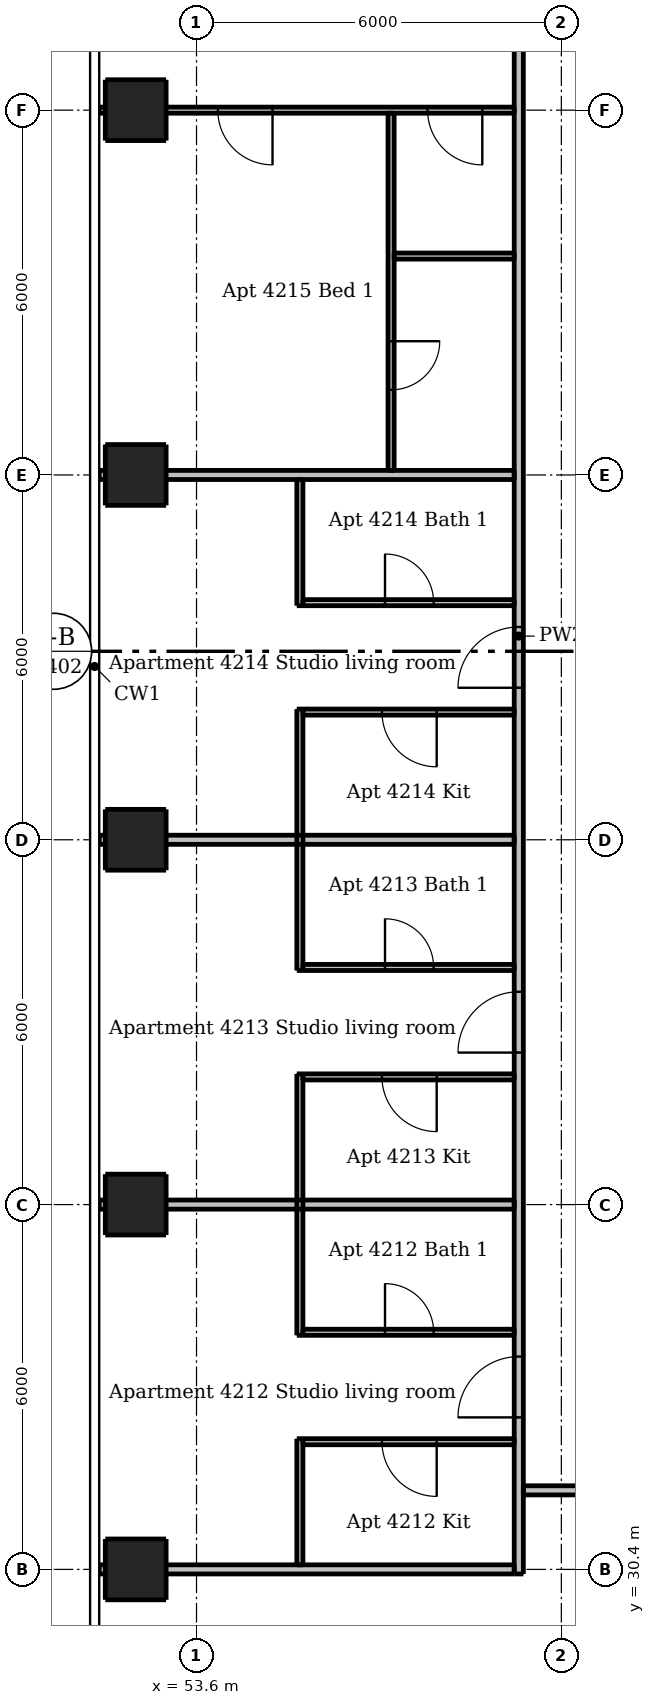
"""IFC4 building model, lengths in metres.
Left out: names, types, materials, properties, quantities, classifications, styles, units other than length and angle.
Written with IfcOpenShell. Run it as: python <this file> out.ifc"""

import sys

from ifc_helpers import new_model, si_unit, direction, frame, frame_2d, origin, origin_2d, place, context, subcontext, project, spatial, rectangle, extrude, element, fill, save


model = new_model("IFC4")
c1 = context("Model", 3, precision=1e-05, world=origin(), true_north=direction((0.0, 1.0)))
c2 = subcontext(c1, "Body", "Model", "MODEL_VIEW")
j1 = project(units=[si_unit("LENGTHUNIT", "METRE"), si_unit("PLANEANGLEUNIT", "RADIAN")], contexts=[c1])
p1 = place(None, origin())
s1 = spatial("IfcSite", under=j1, at=p1, CompositionType="ELEMENT")
p2 = place(p1, origin())
s2 = spatial("IfcBuilding", under=s1, at=p2, CompositionType="ELEMENT")
p3 = place(p2, frame((0.0, 0.0, 158.2)))
s3 = spatial("IfcBuildingStorey", under=s2, at=p3, CompositionType="ELEMENT", Elevation=158.2)
for number, where, z_axis, x_axis in (
    (1, (52.6, 30.4, 0.0), (0.0, 0.0, 1.0), (1.0, 0.0, 0.0)),
    (2, (52.6, 36.4, 0.0), (0.0, 0.0, 1.0), (1.0, 0.0, 0.0)),
    (3, (52.6, 42.4, 0.0), (0.0, 0.0, 1.0), (1.0, 0.0, 0.0)),
    (4, (52.6, 48.4, 0.0), (0.0, 0.0, 1.0), (1.0, 0.0, 0.0)),
    (5, (52.6, 54.4, 0.0), (0.0, 0.0, 1.0), (1.0, 0.0, 0.0)),
):
    element("IfcColumn", number, at=place(p3, frame(where, z_axis=z_axis, x_axis=x_axis)), inside=s3, PredefinedType="COLUMN", context=c2, shape_type="SweptSolid", body=[
        extrude(rectangle(XDim=1.0, YDim=1.0, at=origin_2d()), origin(), (0.0, 0.0, 1.0), 3.05),
    ])
p4 = place(p3, frame((55.3, 30.475, 0.0), z_axis=(0.0, 0.0, 1.0), x_axis=(0.0, 1.0, 0.0)))
e6 = element("IfcWall", 6, at=p4, inside=s3, PredefinedType="PARTITIONING", context=c2, shape_type="SweptSolid", body=[
    extrude(rectangle(XDim=2.075, YDim=0.1, at=frame_2d((1.038, 0.0))), origin(), (0.0, 0.0, 1.0), 3.05),
])
for number, where, z_axis, x_axis in (
    (7, (55.3, 34.25, 0.0), (0.0, 0.0, 1.0), (0.0, 1.0, 0.0)),
    (8, (55.3, 40.25, 0.0), (0.0, 0.0, 1.0), (0.0, 1.0, 0.0)),
):
    element("IfcWall", number, at=place(p3, frame(where, z_axis=z_axis, x_axis=x_axis)), inside=s3, PredefinedType="PARTITIONING", context=c2, shape_type="SweptSolid", body=[
        extrude(rectangle(XDim=4.3, YDim=0.1, at=frame_2d((2.15, 0.0))), origin(), (0.0, 0.0, 1.0), 3.05),
    ])
p5 = place(p3, frame((55.3, 46.25, 0.0), z_axis=(0.0, 0.0, 1.0), x_axis=(0.0, 1.0, 0.0)))
e9 = element("IfcWall", 9, at=p5, inside=s3, PredefinedType="PARTITIONING", context=c2, shape_type="SweptSolid", body=[
    extrude(rectangle(XDim=2.075, YDim=0.1, at=frame_2d((1.038, 0.0))), origin(), (0.0, 0.0, 1.0), 3.05),
])
p6 = place(p3, frame((56.8, 54.35, 0.0), z_axis=(0.0, 0.0, 1.0), x_axis=(0.0, -1.0, 0.0)))
e10 = element("IfcWall", 10, at=p6, inside=s3, PredefinedType="PARTITIONING", context=c2, shape_type="SweptSolid", body=[
    extrude(rectangle(XDim=5.875, YDim=0.1, at=frame_2d((2.938, 0.0))), origin(), (0.0, 0.0, 1.0), 3.05),
])
p7 = place(p6, frame((3.75, 0.0, 0.0)))
e11 = element("IfcOpeningElement", 11, at=p7, cuts=e10, PredefinedType="OPENING", context=c2, shape_type="SweptSolid", body=[
    extrude(rectangle(XDim=0.8, YDim=2.1, at=frame_2d((0.4, 1.05))), frame((0.0, 0.06, 0.0), z_axis=(0.0, -1.0, 0.0), x_axis=(1.0, 0.0, 0.0)), (0.0, 0.0, 1.0), 0.12),
])
p8 = place(p3, frame((58.825, 54.4, 0.0), z_axis=(0.0, 0.0, 1.0), x_axis=(-1.0, 0.0, 0.0)))
e12 = element("IfcWall", 12, at=p8, inside=s3, PredefinedType="PARTITIONING", context=c2, shape_type="SweptSolid", body=[
    extrude(rectangle(XDim=6.825, YDim=0.1, at=frame_2d((3.413, 0.0))), origin(), (0.0, 0.0, 1.0), 2.516),
])
p9 = place(p8, frame((0.525, 0.0, 0.0)))
e13 = element("IfcOpeningElement", 13, at=p9, cuts=e12, PredefinedType="OPENING", context=c2, shape_type="SweptSolid", body=[
    extrude(rectangle(XDim=0.9, YDim=2.1, at=frame_2d((0.45, 1.05))), frame((0.0, 0.06, 0.0), z_axis=(0.0, -1.0, 0.0), x_axis=(1.0, 0.0, 0.0)), (0.0, 0.0, 1.0), 0.12),
])
p10 = place(p8, frame((3.975, 0.0, 0.0)))
e14 = element("IfcOpeningElement", 14, at=p10, cuts=e12, PredefinedType="OPENING", context=c2, shape_type="SweptSolid", body=[
    extrude(rectangle(XDim=0.9, YDim=2.1, at=frame_2d((0.45, 1.05))), frame((0.0, 0.06, 0.0), z_axis=(0.0, -1.0, 0.0), x_axis=(1.0, 0.0, 0.0)), (0.0, 0.0, 1.0), 0.12),
])
p11 = place(p3, frame((56.85, 52.0, 0.0), z_axis=(0.0, 0.0, 1.0), x_axis=(1.0, 0.0, 0.0)))
e15 = element("IfcWall", 15, at=p11, inside=s3, PredefinedType="PARTITIONING", context=c2, shape_type="SweptSolid", body=[
    extrude(rectangle(XDim=1.975, YDim=0.1, at=frame_2d((0.987, 0.0))), origin(), (0.0, 0.0, 1.0), 3.05),
])
p12 = place(p3, frame((55.35, 46.3, 0.0), z_axis=(0.0, 0.0, 1.0), x_axis=(1.0, 0.0, 0.0)))
e16 = element("IfcWall", 16, at=p12, inside=s3, PredefinedType="PARTITIONING", context=c2, shape_type="SweptSolid", body=[
    extrude(rectangle(XDim=3.475, YDim=0.1, at=frame_2d((1.737, 0.0))), origin(), (0.0, 0.0, 1.0), 3.05),
])
p13 = place(p12, frame((1.35, 0.0, 0.0)))
e17 = element("IfcOpeningElement", 17, at=p13, cuts=e16, PredefinedType="OPENING", context=c2, shape_type="SweptSolid", body=[
    extrude(rectangle(XDim=0.8, YDim=2.1, at=frame_2d((0.4, 1.05))), frame((0.0, 0.06, 0.0), z_axis=(0.0, -1.0, 0.0), x_axis=(1.0, 0.0, 0.0)), (0.0, 0.0, 1.0), 0.12),
])
p14 = place(p3, frame((58.825, 44.5, 0.0), z_axis=(0.0, 0.0, 1.0), x_axis=(-1.0, 0.0, 0.0)))
e18 = element("IfcWall", 18, at=p14, inside=s3, PredefinedType="PARTITIONING", context=c2, shape_type="SweptSolid", body=[
    extrude(rectangle(XDim=3.475, YDim=0.1, at=frame_2d((1.737, 0.0))), origin(), (0.0, 0.0, 1.0), 3.05),
])
p15 = place(p14, frame((1.275, 0.0, 0.0)))
e19 = element("IfcOpeningElement", 19, at=p15, cuts=e18, PredefinedType="OPENING", context=c2, shape_type="SweptSolid", body=[
    extrude(rectangle(XDim=0.9, YDim=2.1, at=frame_2d((0.45, 1.05))), frame((0.0, 0.06, 0.0), z_axis=(0.0, -1.0, 0.0), x_axis=(1.0, 0.0, 0.0)), (0.0, 0.0, 1.0), 0.12),
])
p16 = place(p3, frame((55.35, 40.3, 0.0), z_axis=(0.0, 0.0, 1.0), x_axis=(1.0, 0.0, 0.0)))
e20 = element("IfcWall", 20, at=p16, inside=s3, PredefinedType="PARTITIONING", context=c2, shape_type="SweptSolid", body=[
    extrude(rectangle(XDim=3.475, YDim=0.1, at=frame_2d((1.737, 0.0))), origin(), (0.0, 0.0, 1.0), 3.05),
])
p17 = place(p16, frame((1.35, 0.0, 0.0)))
e21 = element("IfcOpeningElement", 21, at=p17, cuts=e20, PredefinedType="OPENING", context=c2, shape_type="SweptSolid", body=[
    extrude(rectangle(XDim=0.8, YDim=2.1, at=frame_2d((0.4, 1.05))), frame((0.0, 0.06, 0.0), z_axis=(0.0, -1.0, 0.0), x_axis=(1.0, 0.0, 0.0)), (0.0, 0.0, 1.0), 0.12),
])
p18 = place(p3, frame((58.825, 38.5, 0.0), z_axis=(0.0, 0.0, 1.0), x_axis=(-1.0, 0.0, 0.0)))
e22 = element("IfcWall", 22, at=p18, inside=s3, PredefinedType="PARTITIONING", context=c2, shape_type="SweptSolid", body=[
    extrude(rectangle(XDim=3.475, YDim=0.1, at=frame_2d((1.737, 0.0))), origin(), (0.0, 0.0, 1.0), 3.05),
])
p19 = place(p18, frame((1.275, 0.0, 0.0)))
e23 = element("IfcOpeningElement", 23, at=p19, cuts=e22, PredefinedType="OPENING", context=c2, shape_type="SweptSolid", body=[
    extrude(rectangle(XDim=0.9, YDim=2.1, at=frame_2d((0.45, 1.05))), frame((0.0, 0.06, 0.0), z_axis=(0.0, -1.0, 0.0), x_axis=(1.0, 0.0, 0.0)), (0.0, 0.0, 1.0), 0.12),
])
p20 = place(p3, frame((55.35, 34.3, 0.0), z_axis=(0.0, 0.0, 1.0), x_axis=(1.0, 0.0, 0.0)))
e24 = element("IfcWall", 24, at=p20, inside=s3, PredefinedType="PARTITIONING", context=c2, shape_type="SweptSolid", body=[
    extrude(rectangle(XDim=3.475, YDim=0.1, at=frame_2d((1.737, 0.0))), origin(), (0.0, 0.0, 1.0), 3.05),
])
p21 = place(p20, frame((1.35, 0.0, 0.0)))
e25 = element("IfcOpeningElement", 25, at=p21, cuts=e24, PredefinedType="OPENING", context=c2, shape_type="SweptSolid", body=[
    extrude(rectangle(XDim=0.8, YDim=2.1, at=frame_2d((0.4, 1.05))), frame((0.0, 0.06, 0.0), z_axis=(0.0, -1.0, 0.0), x_axis=(1.0, 0.0, 0.0)), (0.0, 0.0, 1.0), 0.12),
])
p22 = place(p3, frame((58.825, 32.5, 0.0), z_axis=(0.0, 0.0, 1.0), x_axis=(-1.0, 0.0, 0.0)))
e26 = element("IfcWall", 26, at=p22, inside=s3, PredefinedType="PARTITIONING", context=c2, shape_type="SweptSolid", body=[
    extrude(rectangle(XDim=3.475, YDim=0.1, at=frame_2d((1.737, 0.0))), origin(), (0.0, 0.0, 1.0), 3.05),
])
p23 = place(p22, frame((1.275, 0.0, 0.0)))
e27 = element("IfcOpeningElement", 27, at=p23, cuts=e26, PredefinedType="OPENING", context=c2, shape_type="SweptSolid", body=[
    extrude(rectangle(XDim=0.9, YDim=2.1, at=frame_2d((0.45, 1.05))), frame((0.0, 0.06, 0.0), z_axis=(0.0, -1.0, 0.0), x_axis=(1.0, 0.0, 0.0)), (0.0, 0.0, 1.0), 0.12),
])
p24 = place(p3, frame((58.9, 30.325, 0.0), z_axis=(0.0, 0.0, 1.0), x_axis=(0.0, 1.0, 0.0)))
e28 = element("IfcWall", 28, at=p24, inside=s3, PredefinedType="PARTITIONING", context=c2, shape_type="SweptSolid", body=[
    extrude(rectangle(XDim=30.85, YDim=0.15, at=frame_2d((15.425, 0.0))), origin(), (0.0, 0.0, 1.0), 3.05),
])
p25 = place(p24, frame((2.575, 0.0, 0.0)))
e29 = element("IfcOpeningElement", 29, at=p25, cuts=e28, PredefinedType="OPENING", context=c2, shape_type="SweptSolid", body=[
    extrude(rectangle(XDim=1.0, YDim=2.1, at=frame_2d((0.5, 1.05))), frame((0.0, 0.085, 0.0), z_axis=(0.0, -1.0, 0.0), x_axis=(1.0, 0.0, 0.0)), (0.0, 0.0, 1.0), 0.17),
])
p26 = place(p24, frame((8.575, 0.0, 0.0)))
e30 = element("IfcOpeningElement", 30, at=p26, cuts=e28, PredefinedType="OPENING", context=c2, shape_type="SweptSolid", body=[
    extrude(rectangle(XDim=1.0, YDim=2.1, at=frame_2d((0.5, 1.05))), frame((0.0, 0.085, 0.0), z_axis=(0.0, -1.0, 0.0), x_axis=(1.0, 0.0, 0.0)), (0.0, 0.0, 1.0), 0.17),
])
p27 = place(p24, frame((14.575, 0.0, 0.0)))
e31 = element("IfcOpeningElement", 31, at=p27, cuts=e28, PredefinedType="OPENING", context=c2, shape_type="SweptSolid", body=[
    extrude(rectangle(XDim=1.0, YDim=2.1, at=frame_2d((0.5, 1.05))), frame((0.0, 0.085, 0.0), z_axis=(0.0, -1.0, 0.0), x_axis=(1.0, 0.0, 0.0)), (0.0, 0.0, 1.0), 0.17),
])
p28 = place(p24, frame((26.925, 0.0, 0.0)))
e32 = element("IfcOpeningElement", 32, at=p28, cuts=e28, PredefinedType="OPENING", context=c2, shape_type="SweptSolid", body=[
    extrude(rectangle(XDim=1.0, YDim=2.1, at=frame_2d((0.5, 1.05))), frame((0.0, 0.085, 0.0), z_axis=(0.0, -1.0, 0.0), x_axis=(1.0, 0.0, 0.0)), (0.0, 0.0, 1.0), 0.17),
])
for number, where, z_axis, x_axis in (
    (33, (52.0, 48.4, 0.0), (0.0, 0.0, 1.0), (1.0, 0.0, 0.0)),
    (34, (52.0, 42.4, 0.0), (0.0, 0.0, 1.0), (1.0, 0.0, 0.0)),
    (35, (52.0, 36.4, 0.0), (0.0, 0.0, 1.0), (1.0, 0.0, 0.0)),
):
    element("IfcWall", number, at=place(p3, frame(where, z_axis=z_axis, x_axis=x_axis)), inside=s3, PredefinedType="PARTITIONING", context=c2, shape_type="SweptSolid", body=[
        extrude(rectangle(XDim=6.825, YDim=0.15, at=frame_2d((3.413, 0.0))), origin(), (0.0, 0.0, 1.0), 2.516),
    ])
p29 = place(p3, frame((89.525, 31.7, 0.0), z_axis=(0.0, 0.0, 1.0), x_axis=(-1.0, 0.0, 0.0)))
e36 = element("IfcWall", 36, at=p29, inside=s3, PredefinedType="PARTITIONING", context=c2, shape_type="SweptSolid", body=[
    extrude(rectangle(XDim=30.55, YDim=0.15, at=frame_2d((15.275, 0.0))), origin(), (0.0, 0.0, 1.0), 3.05),
])
p30 = place(p29, frame((26.775, 0.0, 0.0)))
e37 = element("IfcOpeningElement", 37, at=p30, cuts=e36, PredefinedType="OPENING", context=c2, shape_type="SweptSolid", body=[
    extrude(rectangle(XDim=1.0, YDim=2.1, at=frame_2d((0.5, 1.05))), frame((0.0, 0.085, 0.0), z_axis=(0.0, -1.0, 0.0), x_axis=(1.0, 0.0, 0.0)), (0.0, 0.0, 1.0), 0.17),
])
p31 = place(p29, frame((14.425, 0.0, 0.0)))
e38 = element("IfcOpeningElement", 38, at=p31, cuts=e36, PredefinedType="OPENING", context=c2, shape_type="SweptSolid", body=[
    extrude(rectangle(XDim=1.0, YDim=2.1, at=frame_2d((0.5, 1.05))), frame((0.0, 0.085, 0.0), z_axis=(0.0, -1.0, 0.0), x_axis=(1.0, 0.0, 0.0)), (0.0, 0.0, 1.0), 0.17),
])
p32 = place(p29, frame((6.575, 0.0, 0.0)))
e39 = element("IfcOpeningElement", 39, at=p32, cuts=e36, PredefinedType="OPENING", context=c2, shape_type="SweptSolid", body=[
    extrude(rectangle(XDim=1.0, YDim=2.1, at=frame_2d((0.5, 1.05))), frame((0.0, 0.085, 0.0), z_axis=(0.0, -1.0, 0.0), x_axis=(1.0, 0.0, 0.0)), (0.0, 0.0, 1.0), 0.17),
])
p33 = place(p3, frame((52.0, 30.4, 0.0), z_axis=(0.0, 0.0, 1.0), x_axis=(1.0, 0.0, 0.0)))
e40 = element("IfcWall", 40, at=p33, inside=s3, PredefinedType="PARTITIONING", context=c2, shape_type="SweptSolid", body=[
    extrude(rectangle(XDim=6.825, YDim=0.15, at=frame_2d((3.413, 0.0))), origin(), (0.0, 0.0, 1.0), 2.647),
])
p34 = place(p25, origin())
e41 = element("IfcDoor", 41, at=p34, inside=s3, OperationType="SINGLE_SWING_LEFT", PredefinedType="DOOR", context=c2, shape_type="SweptSolid", body=[
    extrude(rectangle(XDim=1.0, YDim=2.1, at=frame_2d((0.5, 1.05))), frame((0.0, 0.025, 0.0), z_axis=(0.0, -1.0, 0.0), x_axis=(1.0, 0.0, 0.0)), (0.0, 0.0, 1.0), 0.05),
])
fill(e29, e41)
p35 = place(p23, origin())
e42 = element("IfcDoor", 42, at=p35, inside=s3, OperationType="SINGLE_SWING_LEFT", PredefinedType="DOOR", context=c2, shape_type="SweptSolid", body=[
    extrude(rectangle(XDim=0.9, YDim=2.1, at=frame_2d((0.45, 1.05))), frame((0.0, 0.025, 0.0), z_axis=(0.0, -1.0, 0.0), x_axis=(1.0, 0.0, 0.0)), (0.0, 0.0, 1.0), 0.05),
])
fill(e27, e42)
p36 = place(p21, origin())
e43 = element("IfcDoor", 43, at=p36, inside=s3, OperationType="SINGLE_SWING_LEFT", PredefinedType="DOOR", context=c2, shape_type="SweptSolid", body=[
    extrude(rectangle(XDim=0.8, YDim=2.1, at=frame_2d((0.4, 1.05))), frame((0.0, 0.025, 0.0), z_axis=(0.0, -1.0, 0.0), x_axis=(1.0, 0.0, 0.0)), (0.0, 0.0, 1.0), 0.05),
])
fill(e25, e43)
p37 = place(p26, origin())
e44 = element("IfcDoor", 44, at=p37, inside=s3, OperationType="SINGLE_SWING_LEFT", PredefinedType="DOOR", context=c2, shape_type="SweptSolid", body=[
    extrude(rectangle(XDim=1.0, YDim=2.1, at=frame_2d((0.5, 1.05))), frame((0.0, 0.025, 0.0), z_axis=(0.0, -1.0, 0.0), x_axis=(1.0, 0.0, 0.0)), (0.0, 0.0, 1.0), 0.05),
])
fill(e30, e44)
p38 = place(p19, origin())
e45 = element("IfcDoor", 45, at=p38, inside=s3, OperationType="SINGLE_SWING_LEFT", PredefinedType="DOOR", context=c2, shape_type="SweptSolid", body=[
    extrude(rectangle(XDim=0.9, YDim=2.1, at=frame_2d((0.45, 1.05))), frame((0.0, 0.025, 0.0), z_axis=(0.0, -1.0, 0.0), x_axis=(1.0, 0.0, 0.0)), (0.0, 0.0, 1.0), 0.05),
])
fill(e23, e45)
p39 = place(p17, origin())
e46 = element("IfcDoor", 46, at=p39, inside=s3, OperationType="SINGLE_SWING_LEFT", PredefinedType="DOOR", context=c2, shape_type="SweptSolid", body=[
    extrude(rectangle(XDim=0.8, YDim=2.1, at=frame_2d((0.4, 1.05))), frame((0.0, 0.025, 0.0), z_axis=(0.0, -1.0, 0.0), x_axis=(1.0, 0.0, 0.0)), (0.0, 0.0, 1.0), 0.05),
])
fill(e21, e46)
p40 = place(p27, origin())
e47 = element("IfcDoor", 47, at=p40, inside=s3, OperationType="SINGLE_SWING_LEFT", PredefinedType="DOOR", context=c2, shape_type="SweptSolid", body=[
    extrude(rectangle(XDim=1.0, YDim=2.1, at=frame_2d((0.5, 1.05))), frame((0.0, 0.025, 0.0), z_axis=(0.0, -1.0, 0.0), x_axis=(1.0, 0.0, 0.0)), (0.0, 0.0, 1.0), 0.05),
])
fill(e31, e47)
p41 = place(p15, origin())
e48 = element("IfcDoor", 48, at=p41, inside=s3, OperationType="SINGLE_SWING_LEFT", PredefinedType="DOOR", context=c2, shape_type="SweptSolid", body=[
    extrude(rectangle(XDim=0.9, YDim=2.1, at=frame_2d((0.45, 1.05))), frame((0.0, 0.025, 0.0), z_axis=(0.0, -1.0, 0.0), x_axis=(1.0, 0.0, 0.0)), (0.0, 0.0, 1.0), 0.05),
])
fill(e19, e48)
p42 = place(p13, origin())
e49 = element("IfcDoor", 49, at=p42, inside=s3, OperationType="SINGLE_SWING_LEFT", PredefinedType="DOOR", context=c2, shape_type="SweptSolid", body=[
    extrude(rectangle(XDim=0.8, YDim=2.1, at=frame_2d((0.4, 1.05))), frame((0.0, 0.025, 0.0), z_axis=(0.0, -1.0, 0.0), x_axis=(1.0, 0.0, 0.0)), (0.0, 0.0, 1.0), 0.05),
])
fill(e17, e49)
p43 = place(p9, origin())
e50 = element("IfcDoor", 50, at=p43, inside=s3, OperationType="SINGLE_SWING_LEFT", PredefinedType="DOOR", context=c2, shape_type="SweptSolid", body=[
    extrude(rectangle(XDim=0.9, YDim=2.1, at=frame_2d((0.45, 1.05))), frame((0.0, 0.025, 0.0), z_axis=(0.0, -1.0, 0.0), x_axis=(1.0, 0.0, 0.0)), (0.0, 0.0, 1.0), 0.05),
])
fill(e13, e50)
p44 = place(p10, origin())
e51 = element("IfcDoor", 51, at=p44, inside=s3, OperationType="SINGLE_SWING_LEFT", PredefinedType="DOOR", context=c2, shape_type="SweptSolid", body=[
    extrude(rectangle(XDim=0.9, YDim=2.1, at=frame_2d((0.45, 1.05))), frame((0.0, 0.025, 0.0), z_axis=(0.0, -1.0, 0.0), x_axis=(1.0, 0.0, 0.0)), (0.0, 0.0, 1.0), 0.05),
])
fill(e14, e51)
p45 = place(p7, origin())
e52 = element("IfcDoor", 52, at=p45, inside=s3, OperationType="SINGLE_SWING_LEFT", PredefinedType="DOOR", context=c2, shape_type="SweptSolid", body=[
    extrude(rectangle(XDim=0.8, YDim=2.1, at=frame_2d((0.4, 1.05))), frame((0.0, 0.025, 0.0), z_axis=(0.0, -1.0, 0.0), x_axis=(1.0, 0.0, 0.0)), (0.0, 0.0, 1.0), 0.05),
])
fill(e11, e52)
save(model, sys.argv[1])
